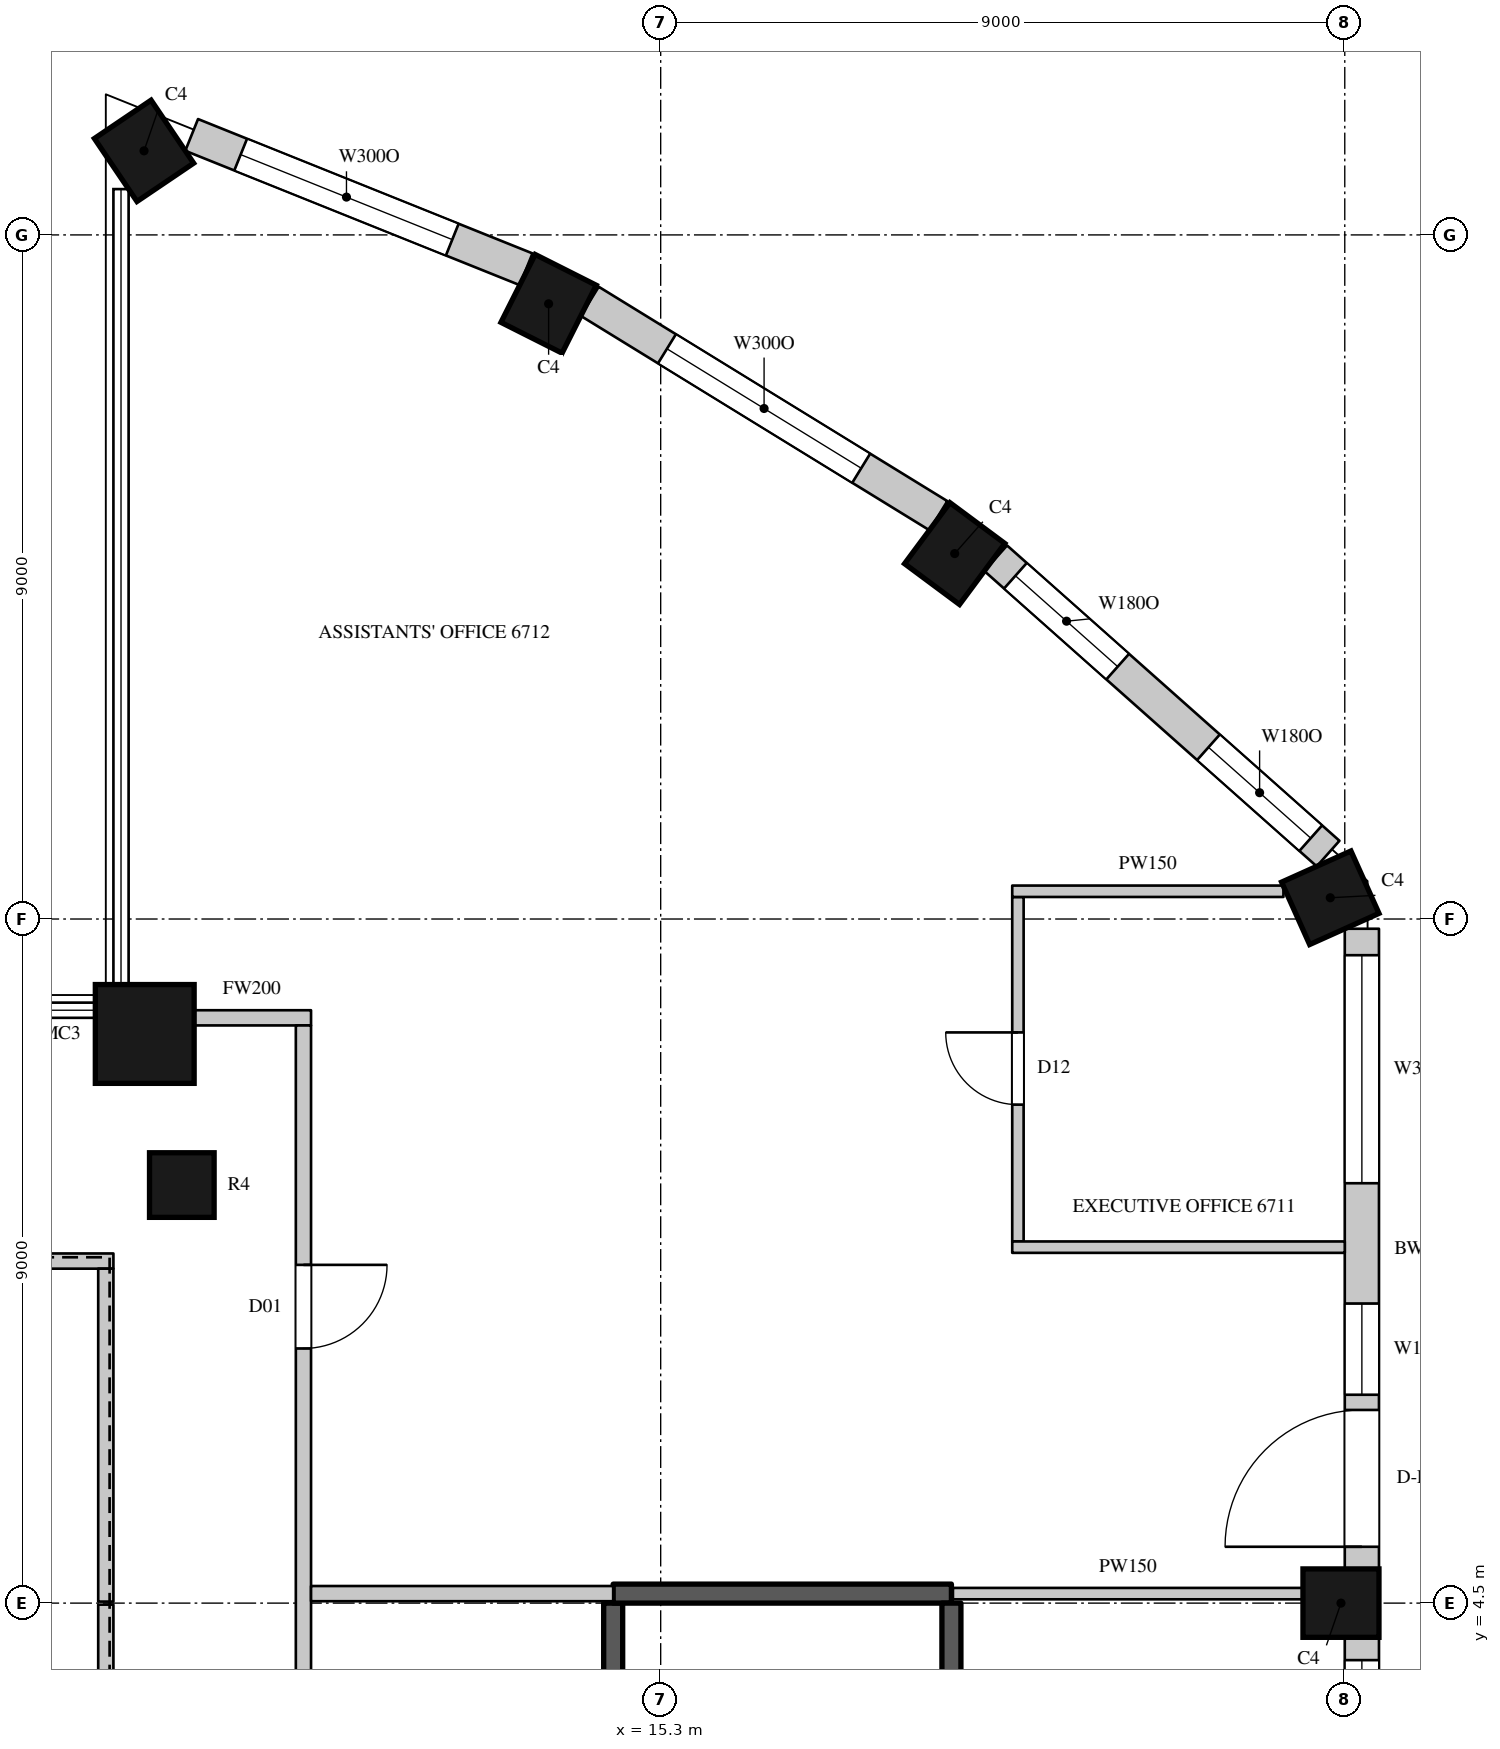
"""IFC4 building model, lengths in metres.
Left out: names, types, materials, properties, quantities, classifications, styles, units other than length and angle.
Written with IfcOpenShell. Run it as: python <this file> out.ifc"""

import sys

from ifc_helpers import new_model, si_unit, direction, frame, frame_2d, origin, origin_2d, place, context, subcontext, project, spatial, rectangle, circle, extrude, element, fill, save


model = new_model("IFC4")
c1 = context("Model", 3, precision=1e-05, world=origin(), true_north=direction((0.0, 1.0)))
c2 = subcontext(c1, "Body", "Model", "MODEL_VIEW")
j1 = project(units=[si_unit("LENGTHUNIT", "METRE"), si_unit("PLANEANGLEUNIT", "RADIAN")], contexts=[c1])
p1 = place(None, origin())
s1 = spatial("IfcSite", under=j1, at=p1, CompositionType="ELEMENT")
p2 = place(p1, origin())
s2 = spatial("IfcBuilding", under=s1, at=p2, CompositionType="ELEMENT")
p3 = place(p2, frame((0.0, 0.0, 296.7)))
s3 = spatial("IfcBuildingStorey", under=s2, at=p3, CompositionType="ELEMENT", Elevation=296.7)
p4 = place(p3, frame((8.503, 23.606, 0.0), z_axis=(0.0, 0.0, 1.0), x_axis=(-0.828469606019, -0.560034027451, 0.0)))
e1 = element("IfcColumn", 1, at=p4, inside=s3, PredefinedType="COLUMN", context=c2, shape_type="SweptSolid", body=[
    extrude(rectangle(XDim=0.9, YDim=1.0, at=origin_2d()), origin(), (0.0, 0.0, 1.0), 4.1),
])
p5 = place(p3, frame((8.512, 11.988, 0.0), z_axis=(0.0, 0.0, 1.0), x_axis=(1.0, 0.0, 0.0)))
e2 = element("IfcColumn", 2, at=p5, inside=s3, PredefinedType="COLUMN", context=c2, shape_type="SweptSolid", body=[
    extrude(circle(Radius=0.65, at=origin_2d()), origin(), (0.0, 0.0, 1.0), 4.1),
])
for number, where, z_axis, x_axis in (
    (3, (24.25, 4.5, 0.0), (0.0, 0.0, 1.0), (0.0, 1.0, 0.0)),
    (4, (24.11, 13.78, 0.0), (0.0, 0.0, 1.0), (-0.41, 0.912, 0.0)),
    (5, (19.168, 18.308, 0.0), (0.0, 0.0, 1.0), (-0.803, 0.596, 0.0)),
    (6, (13.826, 21.594, 0.0), (0.0, 0.0, 1.0), (-0.893, 0.45, 0.0)),
):
    element("IfcColumn", number, at=place(p3, frame(where, z_axis=z_axis, x_axis=x_axis)), inside=s3, PredefinedType="COLUMN", context=c2, shape_type="SweptSolid", body=[
        extrude(rectangle(XDim=0.9, YDim=1.0, at=origin_2d()), origin(), (0.0, 0.0, 1.0), 4.1),
    ])
p6 = place(p3, frame((9.0, 10.0, 0.0), z_axis=(0.0, 0.0, 1.0), x_axis=(1.0, 0.0, 0.0)))
e7 = element("IfcColumn", 7, at=p6, inside=s3, PredefinedType="COLUMN", context=c2, shape_type="SweptSolid", body=[
    extrude(circle(Radius=0.425, at=origin_2d()), origin(), (0.0, 0.0, 1.0), 4.1),
])
p7 = place(p3, frame((24.525, -4.05, 0.0), z_axis=(0.0, 0.0, 1.0), x_axis=(0.0, 1.0, 0.0)))
e8 = element("IfcWall", 8, at=p7, inside=s3, PredefinedType="SOLIDWALL", context=c2, shape_type="SweptSolid", body=[
    extrude(rectangle(XDim=8.1, YDim=0.45, at=frame_2d((4.05, 0.0))), origin(), (0.0, 0.0, 1.0), 3.8),
])
p8 = place(p7, frame((0.3, 0.0, 1.05)))
e9 = element("IfcOpeningElement", 9, at=p8, cuts=e8, PredefinedType="OPENING", context=c2, shape_type="SweptSolid", body=[
    extrude(rectangle(XDim=3.0, YDim=2.4, at=frame_2d((1.5, 1.2))), frame((0.0, 0.235, 0.0), z_axis=(0.0, -1.0, 0.0), x_axis=(1.0, 0.0, 0.0)), (0.0, 0.0, 1.0), 0.47),
])
p9 = place(p7, frame((4.8, 0.0, 1.05)))
e10 = element("IfcOpeningElement", 10, at=p9, cuts=e8, PredefinedType="OPENING", context=c2, shape_type="SweptSolid", body=[
    extrude(rectangle(XDim=3.0, YDim=2.4, at=frame_2d((1.5, 1.2))), frame((0.0, 0.235, 0.0), z_axis=(0.0, -1.0, 0.0), x_axis=(1.0, 0.0, 0.0)), (0.0, 0.0, 1.0), 0.47),
])
p10 = place(p3, frame((24.525, 4.95, 0.0), z_axis=(0.0, 0.0, 1.0), x_axis=(0.0, 1.0, 0.0)))
e11 = element("IfcWall", 11, at=p10, inside=s3, PredefinedType="SOLIDWALL", context=c2, shape_type="SweptSolid", body=[
    extrude(rectangle(XDim=8.422, YDim=0.45, at=frame_2d((4.211, 0.0))), origin(), (0.0, 0.0, 1.0), 3.8),
])
p11 = place(p10, frame((0.291, 0.0, 0.0)))
e12 = element("IfcOpeningElement", 12, at=p11, cuts=e11, PredefinedType="OPENING", context=c2, shape_type="SweptSolid", body=[
    extrude(rectangle(XDim=1.8, YDim=2.4, at=frame_2d((0.9, 1.2))), frame((0.0, 0.235, 0.0), z_axis=(0.0, -1.0, 0.0), x_axis=(1.0, 0.0, 0.0)), (0.0, 0.0, 1.0), 0.47),
])
p12 = place(p10, frame((2.291, 0.0, 1.05)))
e13 = element("IfcOpeningElement", 13, at=p12, cuts=e11, PredefinedType="OPENING", context=c2, shape_type="SweptSolid", body=[
    extrude(rectangle(XDim=1.2, YDim=2.4, at=frame_2d((0.6, 1.2))), frame((0.0, 0.235, 0.0), z_axis=(0.0, -1.0, 0.0), x_axis=(1.0, 0.0, 0.0)), (0.0, 0.0, 1.0), 0.47),
])
p13 = place(p10, frame((5.074, 0.0, 1.05)))
e14 = element("IfcOpeningElement", 14, at=p13, cuts=e11, PredefinedType="OPENING", context=c2, shape_type="SweptSolid", body=[
    extrude(rectangle(XDim=3.0, YDim=2.4, at=frame_2d((1.5, 1.2))), frame((0.0, 0.235, 0.0), z_axis=(0.0, -1.0, 0.0), x_axis=(1.0, 0.0, 0.0)), (0.0, 0.0, 1.0), 0.47),
])
p14 = place(p3, frame((24.081, 14.361, 0.0), z_axis=(0.0, 0.0, 1.0), x_axis=(-0.747570482973, 0.664182484704, 0.0)))
e15 = element("IfcWall", 15, at=p14, inside=s3, PredefinedType="SOLIDWALL", context=c2, shape_type="SweptSolid", body=[
    extrude(rectangle(XDim=5.85, YDim=0.45, at=frame_2d((2.925, 0.0))), origin(), (0.0, 0.0, 1.0), 3.8),
])
p15 = place(p14, frame((0.305, 0.0, 1.05)))
e16 = element("IfcOpeningElement", 16, at=p15, cuts=e15, PredefinedType="OPENING", context=c2, shape_type="SweptSolid", body=[
    extrude(rectangle(XDim=1.8, YDim=2.4, at=frame_2d((0.9, 1.2))), frame((0.0, 0.235, 0.0), z_axis=(0.0, -1.0, 0.0), x_axis=(1.0, 0.0, 0.0)), (0.0, 0.0, 1.0), 0.47),
])
p16 = place(p14, frame((3.703, 0.0, 1.05)))
e17 = element("IfcOpeningElement", 17, at=p16, cuts=e15, PredefinedType="OPENING", context=c2, shape_type="SweptSolid", body=[
    extrude(rectangle(XDim=1.8, YDim=2.4, at=frame_2d((0.9, 1.2))), frame((0.0, 0.235, 0.0), z_axis=(0.0, -1.0, 0.0), x_axis=(1.0, 0.0, 0.0)), (0.0, 0.0, 1.0), 0.47),
])
p17 = place(p3, frame((18.953, 18.806, 0.0), z_axis=(0.0, 0.0, 1.0), x_axis=(-0.851860664503, 0.523768468193, 0.0)))
e18 = element("IfcWall", 18, at=p17, inside=s3, PredefinedType="SOLIDWALL", context=c2, shape_type="SweptSolid", body=[
    extrude(rectangle(XDim=5.384, YDim=0.45, at=frame_2d((2.692, 0.0))), origin(), (0.0, 0.0, 1.0), 3.8),
])
p18 = place(p17, frame((1.192, 0.0, 1.05)))
e19 = element("IfcOpeningElement", 19, at=p18, cuts=e18, PredefinedType="OPENING", context=c2, shape_type="SweptSolid", body=[
    extrude(rectangle(XDim=3.0, YDim=2.4, at=frame_2d((1.5, 1.2))), frame((0.0, 0.235, 0.0), z_axis=(0.0, -1.0, 0.0), x_axis=(1.0, 0.0, 0.0)), (0.0, 0.0, 1.0), 0.47),
])
p19 = place(p3, frame((13.529, 22.048, 0.0), z_axis=(0.0, 0.0, 1.0), x_axis=(-0.927957332619, 0.372686448424, 0.0)))
e20 = element("IfcWall", 20, at=p19, inside=s3, PredefinedType="SOLIDWALL", context=c2, shape_type="SweptSolid", body=[
    extrude(rectangle(XDim=4.741, YDim=0.45, at=frame_2d((2.371, 0.0))), origin(), (0.0, 0.0, 1.0), 3.8),
])
p20 = place(p19, frame((1.047, 0.0, 1.05)))
e21 = element("IfcOpeningElement", 21, at=p20, cuts=e20, PredefinedType="OPENING", context=c2, shape_type="SweptSolid", body=[
    extrude(rectangle(XDim=3.0, YDim=2.4, at=frame_2d((1.5, 1.2))), frame((0.0, 0.235, 0.0), z_axis=(0.0, -1.0, 0.0), x_axis=(1.0, 0.0, 0.0)), (0.0, 0.0, 1.0), 0.47),
])
p21 = place(p3, frame((-6.1, 9.0, 0.0), z_axis=(0.0, 0.0, 1.0), x_axis=(1.0, 0.0, 0.0)))
e22 = element("IfcWall", 22, at=p21, inside=s3, PredefinedType="PARTITIONING", context=c2, shape_type="SweptSolid", body=[
    extrude(rectangle(XDim=14.2, YDim=0.2, at=frame_2d((7.1, 0.0))), origin(), (0.0, 0.0, 1.0), 3.8),
])
p22 = place(p3, frame((8.0, -8.9, 0.0), z_axis=(0.0, 0.0, 1.0), x_axis=(0.0, 1.0, 0.0)))
e23 = element("IfcWall", 23, at=p22, inside=s3, PredefinedType="PARTITIONING", context=c2, shape_type="SweptSolid", body=[
    extrude(rectangle(XDim=13.38, YDim=0.2, at=frame_2d((6.69, 0.0))), origin(), (0.0, 0.0, 1.0), 3.8),
])
p23 = place(p3, frame((8.0, 4.52, 0.0), z_axis=(0.0, 0.0, 1.0), x_axis=(0.0, 1.0, 0.0)))
e24 = element("IfcWall", 24, at=p23, inside=s3, PredefinedType="PARTITIONING", context=c2, shape_type="SweptSolid", body=[
    extrude(rectangle(XDim=4.38, YDim=0.2, at=frame_2d((2.19, 0.0))), origin(), (0.0, 0.0, 1.0), 3.8),
])
p24 = place(p3, frame((9.144, 12.2, 0.0), z_axis=(0.0, 0.0, 1.0), x_axis=(1.0, 0.0, 0.0)))
e25 = element("IfcWall", 25, at=p24, inside=s3, PredefinedType="PARTITIONING", context=c2, shape_type="SweptSolid", body=[
    extrude(rectangle(XDim=1.556, YDim=0.2, at=frame_2d((0.778, 0.0))), origin(), (0.0, 0.0, 1.0), 3.8),
])
p25 = place(p3, frame((10.6, -11.6, 0.0), z_axis=(0.0, 0.0, 1.0), x_axis=(0.0, 1.0, 0.0)))
e26 = element("IfcWall", 26, at=p25, inside=s3, PredefinedType="PARTITIONING", context=c2, shape_type="SweptSolid", body=[
    extrude(rectangle(XDim=23.7, YDim=0.2, at=frame_2d((11.85, 0.0))), origin(), (0.0, 0.0, 1.0), 3.8),
])
p26 = place(p25, frame((9.45, 0.0, 0.0)))
e27 = element("IfcOpeningElement", 27, at=p26, cuts=e26, PredefinedType="OPENING", context=c2, shape_type="SweptSolid", body=[
    extrude(rectangle(XDim=1.5, YDim=2.4, at=frame_2d((0.75, 1.2))), frame((0.0, 0.11, 0.0), z_axis=(0.0, -1.0, 0.0), x_axis=(1.0, 0.0, 0.0)), (0.0, 0.0, 1.0), 0.22),
])
p27 = place(p25, frame((19.45, 0.0, 0.0)))
e28 = element("IfcOpeningElement", 28, at=p27, cuts=e26, PredefinedType="OPENING", context=c2, shape_type="SweptSolid", body=[
    extrude(rectangle(XDim=1.1, YDim=2.4, at=frame_2d((0.55, 1.2))), frame((0.0, 0.11, 0.0), z_axis=(0.0, -1.0, 0.0), x_axis=(1.0, 0.0, 0.0)), (0.0, 0.0, 1.0), 0.22),
])
p28 = place(p25, frame((4.6, 0.0, 0.0)))
e29 = element("IfcOpeningElement", 29, at=p28, cuts=e26, PredefinedType="OPENING", context=c2, shape_type="SweptSolid", body=[
    extrude(rectangle(XDim=1.1, YDim=2.4, at=frame_2d((0.55, 1.2))), frame((0.0, 0.11, 0.0), z_axis=(0.0, -1.0, 0.0), x_axis=(1.0, 0.0, 0.0)), (0.0, 0.0, 1.0), 0.22),
])
p29 = place(p3, frame((10.7, 4.625, 0.0), z_axis=(0.0, 0.0, 1.0), x_axis=(1.0, 0.0, 0.0)))
e30 = element("IfcWall", 30, at=p29, inside=s3, PredefinedType="PARTITIONING", context=c2, shape_type="SweptSolid", body=[
    extrude(rectangle(XDim=3.975, YDim=0.2, at=frame_2d((1.988, 0.0))), origin(), (0.0, 0.0, 1.0), 3.8),
])
p30 = place(p3, frame((19.145, 4.625, 0.0), z_axis=(0.0, 0.0, 1.0), x_axis=(1.0, 0.0, 0.0)))
e31 = element("IfcWall", 31, at=p30, inside=s3, PredefinedType="PARTITIONING", context=c2, shape_type="SweptSolid", body=[
    extrude(rectangle(XDim=4.605, YDim=0.15, at=frame_2d((2.302, 0.0))), origin(), (0.0, 0.0, 1.0), 3.8),
])
p31 = place(p3, frame((20.0, 9.258, 0.0), z_axis=(0.0, 0.0, 1.0), x_axis=(0.0, 1.0, 0.0)))
e32 = element("IfcWall", 32, at=p31, inside=s3, PredefinedType="PARTITIONING", context=c2, shape_type="SweptSolid", body=[
    extrude(rectangle(XDim=4.532, YDim=0.15, at=frame_2d((2.266, 0.0))), origin(), (0.0, 0.0, 1.0), 3.8),
])
p32 = place(p31, frame((1.8, 0.0, 0.0)))
e33 = element("IfcOpeningElement", 33, at=p32, cuts=e32, PredefinedType="OPENING", context=c2, shape_type="SweptSolid", body=[
    extrude(rectangle(XDim=0.95, YDim=2.2, at=frame_2d((0.475, 1.1))), frame((0.0, 0.085, 0.0), z_axis=(0.0, -1.0, 0.0), x_axis=(1.0, 0.0, 0.0)), (0.0, 0.0, 1.0), 0.17),
])
p33 = place(p3, frame((19.925, 9.183, 0.0), z_axis=(0.0, 0.0, 1.0), x_axis=(1.0, 0.0, 0.0)))
e34 = element("IfcWall", 34, at=p33, inside=s3, PredefinedType="PARTITIONING", context=c2, shape_type="SweptSolid", body=[
    extrude(rectangle(XDim=4.375, YDim=0.15, at=frame_2d((2.188, 0.0))), origin(), (0.0, 0.0, 1.0), 3.15),
])
p34 = place(p3, frame((19.925, 13.865, 0.0), z_axis=(0.0, 0.0, 1.0), x_axis=(1.0, 0.0, 0.0)))
e35 = element("IfcWall", 35, at=p34, inside=s3, PredefinedType="PARTITIONING", context=c2, shape_type="SweptSolid", body=[
    extrude(rectangle(XDim=3.568, YDim=0.15, at=frame_2d((1.784, 0.0))), origin(), (0.0, 0.0, 1.0), 3.8),
])
p35 = place(p3, frame((14.675, -4.5, 0.0), z_axis=(0.0, 0.0, 1.0), x_axis=(0.0, 1.0, 0.0)))
e36 = element("IfcWall", 36, at=p35, inside=s3, PredefinedType="SHEAR", context=c2, shape_type="SweptSolid", body=[
    extrude(rectangle(XDim=9.0, YDim=0.25, at=frame_2d((4.5, 0.0))), origin(), (0.0, 0.0, 1.0), 3.8),
])
p36 = place(p35, frame((0.45, 0.0, 0.0)))
e37 = element("IfcOpeningElement", 37, at=p36, cuts=e36, PredefinedType="OPENING", context=c2, shape_type="SweptSolid", body=[
    extrude(rectangle(XDim=1.1, YDim=2.2, at=frame_2d((0.55, 1.1))), frame((0.0, 0.135, 0.0), z_axis=(0.0, -1.0, 0.0), x_axis=(1.0, 0.0, 0.0)), (0.0, 0.0, 1.0), 0.27),
])
p37 = place(p3, frame((14.675, 4.625, 0.0), z_axis=(0.0, 0.0, 1.0), x_axis=(1.0, 0.0, 0.0)))
e38 = element("IfcWall", 38, at=p37, inside=s3, PredefinedType="SHEAR", context=c2, shape_type="SweptSolid", body=[
    extrude(rectangle(XDim=4.45, YDim=0.25, at=frame_2d((2.225, 0.0))), origin(), (0.0, 0.0, 1.0), 3.8),
])
p38 = place(p3, frame((19.125, -4.5, 0.0), z_axis=(0.0, 0.0, 1.0), x_axis=(0.0, 1.0, 0.0)))
e39 = element("IfcWall", 39, at=p38, inside=s3, PredefinedType="SHEAR", context=c2, shape_type="SweptSolid", body=[
    extrude(rectangle(XDim=9.0, YDim=0.25, at=frame_2d((4.5, 0.0))), origin(), (0.0, 0.0, 1.0), 3.8),
])
p39 = place(p9, origin())
e40 = element("IfcWindow", 40, at=p39, inside=s3, PartitioningType="SINGLE_PANEL", PredefinedType="WINDOW", context=c2, shape_type="SweptSolid", body=[
    extrude(rectangle(XDim=3.0, YDim=2.4, at=frame_2d((1.5, 1.2))), frame((0.0, 0.135, 0.0), z_axis=(0.0, -1.0, 0.0), x_axis=(1.0, 0.0, 0.0)), (0.0, 0.0, 1.0), 0.06),
])
fill(e10, e40)
p40 = place(p11, origin())
e41 = element("IfcDoor", 41, at=p40, inside=s3, OperationType="SLIDING_TO_LEFT", PredefinedType="DOOR", context=c2, shape_type="SweptSolid", body=[
    extrude(rectangle(XDim=1.8, YDim=2.4, at=frame_2d((0.9, 1.2))), frame((0.0, 0.13, 0.0), z_axis=(0.0, -1.0, 0.0), x_axis=(1.0, 0.0, 0.0)), (0.0, 0.0, 1.0), 0.05),
])
fill(e12, e41)
p41 = place(p12, origin())
e42 = element("IfcWindow", 42, at=p41, inside=s3, PartitioningType="SINGLE_PANEL", PredefinedType="WINDOW", context=c2, shape_type="SweptSolid", body=[
    extrude(rectangle(XDim=1.2, YDim=2.4, at=frame_2d((0.6, 1.2))), frame((0.0, 0.135, 0.0), z_axis=(0.0, -1.0, 0.0), x_axis=(1.0, 0.0, 0.0)), (0.0, 0.0, 1.0), 0.06),
])
fill(e13, e42)
p42 = place(p13, origin())
e43 = element("IfcWindow", 43, at=p42, inside=s3, PartitioningType="SINGLE_PANEL", PredefinedType="WINDOW", context=c2, shape_type="SweptSolid", body=[
    extrude(rectangle(XDim=3.0, YDim=2.4, at=frame_2d((1.5, 1.2))), frame((0.0, 0.135, 0.0), z_axis=(0.0, -1.0, 0.0), x_axis=(1.0, 0.0, 0.0)), (0.0, 0.0, 1.0), 0.06),
])
fill(e14, e43)
p43 = place(p15, origin())
e44 = element("IfcWindow", 44, at=p43, inside=s3, PartitioningType="SINGLE_PANEL", PredefinedType="WINDOW", context=c2, shape_type="SweptSolid", body=[
    extrude(rectangle(XDim=1.8, YDim=2.4, at=frame_2d((0.9, 1.2))), frame((0.0, 0.135, 0.0), z_axis=(0.0, -1.0, 0.0), x_axis=(1.0, 0.0, 0.0)), (0.0, 0.0, 1.0), 0.06),
])
fill(e16, e44)
p44 = place(p16, origin())
e45 = element("IfcWindow", 45, at=p44, inside=s3, PartitioningType="SINGLE_PANEL", PredefinedType="WINDOW", context=c2, shape_type="SweptSolid", body=[
    extrude(rectangle(XDim=1.8, YDim=2.4, at=frame_2d((0.9, 1.2))), frame((0.0, 0.135, 0.0), z_axis=(0.0, -1.0, 0.0), x_axis=(1.0, 0.0, 0.0)), (0.0, 0.0, 1.0), 0.06),
])
fill(e17, e45)
p45 = place(p18, origin())
e46 = element("IfcWindow", 46, at=p45, inside=s3, PartitioningType="SINGLE_PANEL", PredefinedType="WINDOW", context=c2, shape_type="SweptSolid", body=[
    extrude(rectangle(XDim=3.0, YDim=2.4, at=frame_2d((1.5, 1.2))), frame((0.0, 0.135, 0.0), z_axis=(0.0, -1.0, 0.0), x_axis=(1.0, 0.0, 0.0)), (0.0, 0.0, 1.0), 0.06),
])
fill(e19, e46)
p46 = place(p20, origin())
e47 = element("IfcWindow", 47, at=p46, inside=s3, PartitioningType="SINGLE_PANEL", PredefinedType="WINDOW", context=c2, shape_type="SweptSolid", body=[
    extrude(rectangle(XDim=3.0, YDim=2.4, at=frame_2d((1.5, 1.2))), frame((0.0, 0.135, 0.0), z_axis=(0.0, -1.0, 0.0), x_axis=(1.0, 0.0, 0.0)), (0.0, 0.0, 1.0), 0.06),
])
fill(e21, e47)
p47 = place(p27, origin())
e48 = element("IfcDoor", 48, at=p47, inside=s3, OperationType="SINGLE_SWING_LEFT", PredefinedType="DOOR", context=c2, shape_type="SweptSolid", body=[
    extrude(rectangle(XDim=1.1, YDim=2.4, at=frame_2d((0.55, 1.2))), frame((0.0, 0.025, 0.0), z_axis=(0.0, -1.0, 0.0), x_axis=(1.0, 0.0, 0.0)), (0.0, 0.0, 1.0), 0.05),
])
fill(e28, e48)
p48 = place(p32, origin())
e49 = element("IfcDoor", 49, at=p48, inside=s3, OperationType="SINGLE_SWING_RIGHT", PredefinedType="DOOR", context=c2, shape_type="SweptSolid", body=[
    extrude(rectangle(XDim=0.95, YDim=2.2, at=frame_2d((0.475, 1.1))), frame((0.0, 0.025, 0.0), z_axis=(0.0, -1.0, 0.0), x_axis=(1.0, 0.0, 0.0)), (0.0, 0.0, 1.0), 0.05),
])
fill(e33, e49)
save(model, sys.argv[1])
